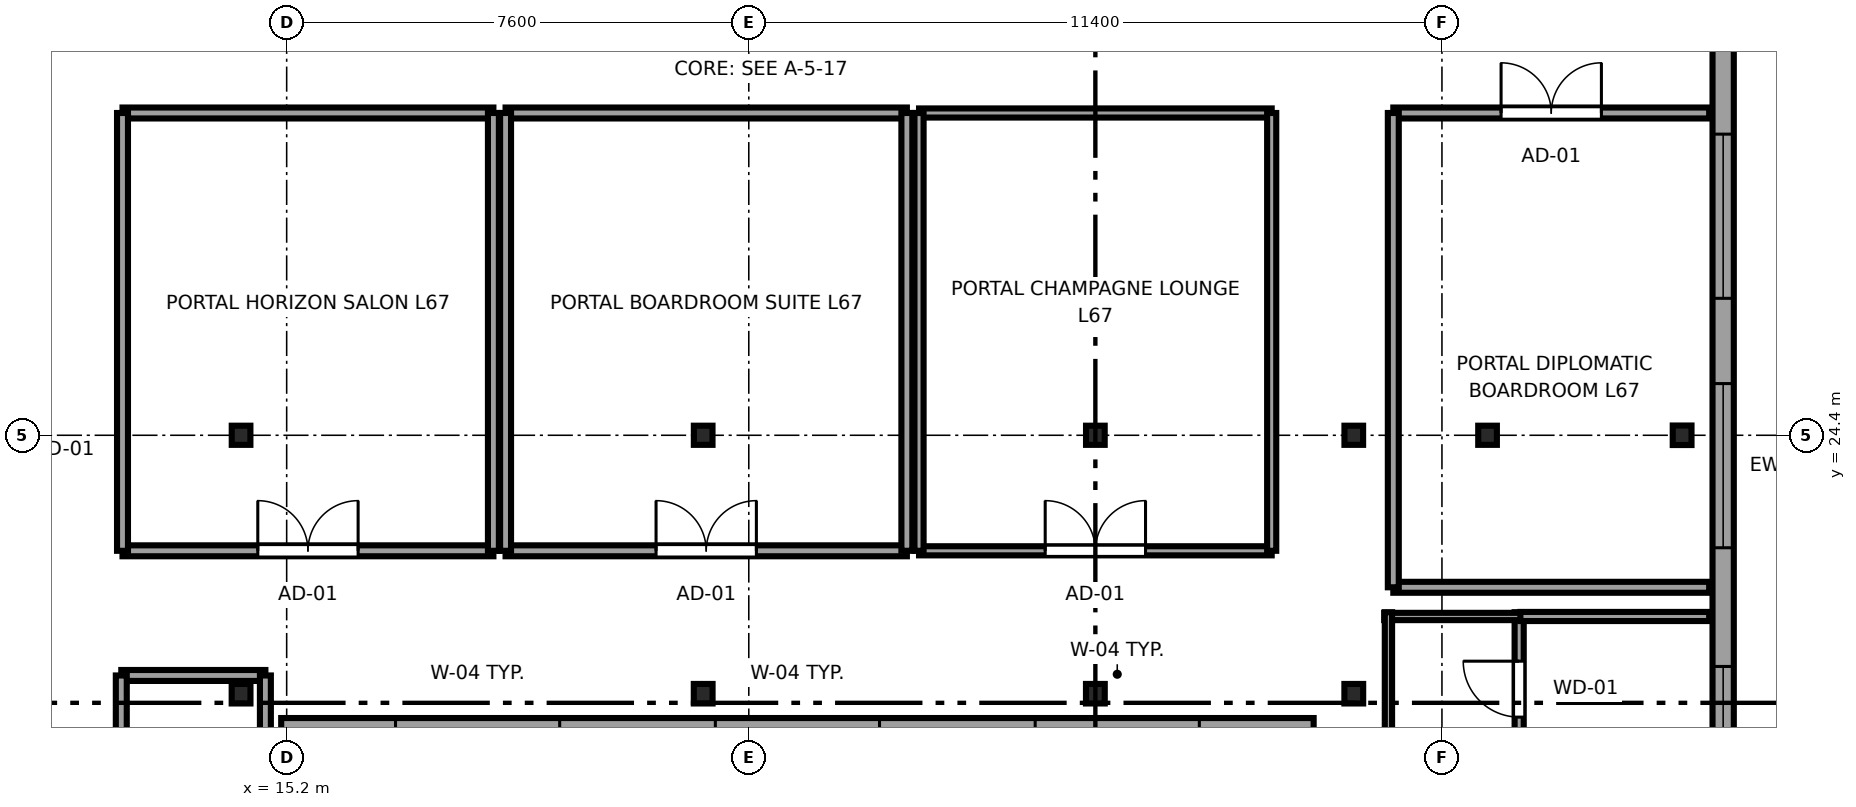
"""IFC4 building model, lengths in metres.
Left out: names, types, materials, properties, quantities, classifications, styles, units other than length and angle.
Written with IfcOpenShell. Run it as: python <this file> out.ifc"""

import sys

from ifc_helpers import new_model, si_unit, direction, frame, frame_2d, origin, origin_2d, place, context, subcontext, project, spatial, rectangle, i_section, extrude, source, transform, mapped, element, fill, save


model = new_model("IFC4")
c1 = context("Model", 3, precision=1e-05, world=origin(), true_north=direction((0.0, 1.0)))
c2 = subcontext(c1, "Body", "Model", "MODEL_VIEW")
j1 = project(units=[si_unit("LENGTHUNIT", "METRE"), si_unit("PLANEANGLEUNIT", "RADIAN")], contexts=[c1])
p1 = place(None, origin())
s1 = spatial("IfcSite", under=j1, at=p1, CompositionType="ELEMENT")
p2 = place(p1, origin())
s2 = spatial("IfcBuilding", under=s1, at=p2, CompositionType="ELEMENT")
p3 = place(p2, frame((0.0, 0.0, 252.3)))
s3 = spatial("IfcBuildingStorey", under=s2, at=p3, CompositionType="ELEMENT", Elevation=252.3)
m1 = source(origin(), c2, "Body", "SweptSolid", [
    extrude(i_section(OverallWidth=0.307, OverallDepth=0.315, WebThickness=0.012, FlangeThickness=0.019, FilletRadius=0.017, at=origin_2d()), origin(), (0.0, 0.0, 1.0), 3.55),
])
for number, where, z_axis, x_axis in (
    (1, (14.45, 24.4, 0.0), (0.0, 0.0, 1.0), (1.0, 0.0, 0.0)),
    (2, (22.05, 24.4, 0.0), (0.0, 0.0, 1.0), (1.0, 0.0, 0.0)),
    (3, (28.5, 24.4, 0.0), (0.0, 0.0, 1.0), (1.0, 0.0, 0.0)),
    (4, (32.75, 24.4, 0.0), (0.0, 0.0, 1.0), (1.0, 0.0, 0.0)),
    (5, (34.95, 24.4, 0.0), (0.0, 0.0, 1.0), (1.0, 0.0, 0.0)),
):
    element("IfcColumn", number, at=place(p3, frame(where, z_axis=z_axis, x_axis=x_axis)), inside=s3, PredefinedType="COLUMN", context=c2, shape_type="MappedRepresentation", body=[
        mapped(m1, transform((0.0, 0.0, 0.0), x_axis=(1.0, 0.0, 0.0), y_axis=(0.0, 1.0, 0.0), z_axis=(0.0, 0.0, 1.0), scale=1.0)),
    ])
m2 = source(origin(), c2, "Body", "SweptSolid", [
    extrude(i_section(OverallWidth=0.309, OverallDepth=0.321, WebThickness=0.014, FlangeThickness=0.022, FilletRadius=0.017, at=origin_2d()), origin(), (0.0, 0.0, 1.0), 3.55),
])
for number, where, z_axis, x_axis in (
    (6, (38.15, 24.4, 0.0), (0.0, 0.0, 1.0), (1.0, 0.0, 0.0)),
    (7, (14.45, 20.15, 0.0), (0.0, 0.0, 1.0), (1.0, 0.0, 0.0)),
    (8, (22.05, 20.15, 0.0), (0.0, 0.0, 1.0), (1.0, 0.0, 0.0)),
    (9, (28.5, 20.15, 0.0), (0.0, 0.0, 1.0), (1.0, 0.0, 0.0)),
    (10, (32.75, 20.15, 0.0), (0.0, 0.0, 1.0), (1.0, 0.0, 0.0)),
):
    element("IfcColumn", number, at=place(p3, frame(where, z_axis=z_axis, x_axis=x_axis)), inside=s3, PredefinedType="COLUMN", context=c2, shape_type="MappedRepresentation", body=[
        mapped(m2, transform((0.0, 0.0, 0.0), x_axis=(1.0, 0.0, 0.0), y_axis=(0.0, 1.0, 0.0), z_axis=(0.0, 0.0, 1.0), scale=1.0)),
    ])
p4 = place(p3, frame((15.11, 19.575, 0.0), z_axis=(0.0, 0.0, 1.0), x_axis=(1.0, 0.0, 0.0)))
e11 = element("IfcWall", 11, at=p4, inside=s3, PredefinedType="SOLIDWALL", context=c2, shape_type="SweptSolid", body=[
    extrude(rectangle(XDim=16.98, YDim=0.35, at=frame_2d((8.49, 0.0))), origin(), (0.0, 0.0, 1.0), 3.37),
])
p5 = place(p4, frame((1.88, 0.0, 0.68)))
e12 = element("IfcOpeningElement", 12, at=p5, cuts=e11, PredefinedType="OPENING", context=c2, shape_type="SweptSolid", body=[
    extrude(rectangle(XDim=2.7, YDim=1.95, at=frame_2d((1.35, 0.975))), frame((0.0, 0.185, 0.0), z_axis=(0.0, -1.0, 0.0), x_axis=(1.0, 0.0, 0.0)), (0.0, 0.0, 1.0), 0.37),
])
p6 = place(p4, frame((7.14, 0.0, 0.68)))
e13 = element("IfcOpeningElement", 13, at=p6, cuts=e11, PredefinedType="OPENING", context=c2, shape_type="SweptSolid", body=[
    extrude(rectangle(XDim=2.7, YDim=1.95, at=frame_2d((1.35, 0.975))), frame((0.0, 0.185, 0.0), z_axis=(0.0, -1.0, 0.0), x_axis=(1.0, 0.0, 0.0)), (0.0, 0.0, 1.0), 0.37),
])
p7 = place(p4, frame((12.4, 0.0, 0.68)))
e14 = element("IfcOpeningElement", 14, at=p7, cuts=e11, PredefinedType="OPENING", context=c2, shape_type="SweptSolid", body=[
    extrude(rectangle(XDim=2.7, YDim=1.95, at=frame_2d((1.35, 0.975))), frame((0.0, 0.185, 0.0), z_axis=(0.0, -1.0, 0.0), x_axis=(1.0, 0.0, 0.0)), (0.0, 0.0, 1.0), 0.37),
])
p8 = place(p3, frame((38.825, 7.017, 0.0), z_axis=(0.0, 0.0, 1.0), x_axis=(0.0, 1.0, 0.0)))
e15 = element("IfcWall", 15, at=p8, inside=s3, PredefinedType="SOLIDWALL", context=c2, shape_type="SweptSolid", body=[
    extrude(rectangle(XDim=33.766, YDim=0.35, at=frame_2d((16.883, 0.0))), origin(), (0.0, 0.0, 1.0), 3.37),
])
p9 = place(p8, frame((10.881, 0.0, 0.68)))
e16 = element("IfcOpeningElement", 16, at=p9, cuts=e15, PredefinedType="OPENING", context=c2, shape_type="SweptSolid", body=[
    extrude(rectangle(XDim=2.7, YDim=1.95, at=frame_2d((1.35, 0.975))), frame((0.0, 0.185, 0.0), z_axis=(0.0, -1.0, 0.0), x_axis=(1.0, 0.0, 0.0)), (0.0, 0.0, 1.0), 0.37),
])
p10 = place(p8, frame((15.533, 0.0, 0.68)))
e17 = element("IfcOpeningElement", 17, at=p10, cuts=e15, PredefinedType="OPENING", context=c2, shape_type="SweptSolid", body=[
    extrude(rectangle(XDim=2.7, YDim=1.95, at=frame_2d((1.35, 0.975))), frame((0.0, 0.185, 0.0), z_axis=(0.0, -1.0, 0.0), x_axis=(1.0, 0.0, 0.0)), (0.0, 0.0, 1.0), 0.37),
])
p11 = place(p8, frame((19.635, 0.0, 0.68)))
e18 = element("IfcOpeningElement", 18, at=p11, cuts=e15, PredefinedType="OPENING", context=c2, shape_type="SweptSolid", body=[
    extrude(rectangle(XDim=2.7, YDim=1.95, at=frame_2d((1.35, 0.975))), frame((0.0, 0.185, 0.0), z_axis=(0.0, -1.0, 0.0), x_axis=(1.0, 0.0, 0.0)), (0.0, 0.0, 1.0), 0.37),
])
p12 = place(p8, frame((25.387, 0.0, 0.68)))
e19 = element("IfcOpeningElement", 19, at=p12, cuts=e15, PredefinedType="OPENING", context=c2, shape_type="SweptSolid", body=[
    extrude(rectangle(XDim=2.7, YDim=1.95, at=frame_2d((1.35, 0.975))), frame((0.0, 0.185, 0.0), z_axis=(0.0, -1.0, 0.0), x_axis=(1.0, 0.0, 0.0)), (0.0, 0.0, 1.0), 0.37),
])
p13 = place(p8, frame((29.489, 0.0, 0.68)))
e20 = element("IfcOpeningElement", 20, at=p13, cuts=e15, PredefinedType="OPENING", context=c2, shape_type="SweptSolid", body=[
    extrude(rectangle(XDim=2.7, YDim=1.95, at=frame_2d((1.35, 0.975))), frame((0.0, 0.185, 0.0), z_axis=(0.0, -1.0, 0.0), x_axis=(1.0, 0.0, 0.0)), (0.0, 0.0, 1.0), 0.37),
])
p14 = place(p8, frame((0.686, 0.0, 0.62)))
e21 = element("IfcOpeningElement", 21, at=p14, cuts=e15, PredefinedType="OPENING", context=c2, shape_type="SweptSolid", body=[
    extrude(rectangle(XDim=1.5, YDim=1.55, at=frame_2d((0.75, 0.775))), frame((0.0, 0.185, 0.0), z_axis=(0.0, -1.0, 0.0), x_axis=(1.0, 0.0, 0.0)), (0.0, 0.0, 1.0), 0.37),
])
p15 = place(p8, frame((4.733, 0.0, 0.62)))
e22 = element("IfcOpeningElement", 22, at=p15, cuts=e15, PredefinedType="OPENING", context=c2, shape_type="SweptSolid", body=[
    extrude(rectangle(XDim=1.5, YDim=1.55, at=frame_2d((0.75, 0.775))), frame((0.0, 0.185, 0.0), z_axis=(0.0, -1.0, 0.0), x_axis=(1.0, 0.0, 0.0)), (0.0, 0.0, 1.0), 0.37),
])
p16 = place(p3, frame((35.47, 19.1, 0.0), z_axis=(0.0, 0.0, 1.0), x_axis=(0.0, 1.0, 0.0)))
e23 = element("IfcWall", 23, at=p16, inside=s3, PredefinedType="PARTITIONING", context=c2, shape_type="SweptSolid", body=[
    extrude(rectangle(XDim=2.39, YDim=0.15, at=frame_2d((1.195, 0.0))), origin(), (0.0, 0.0, 1.0), 3.37),
])
p17 = place(p16, frame((0.665, 0.0, 0.0)))
e24 = element("IfcOpeningElement", 24, at=p17, cuts=e23, PredefinedType="OPENING", context=c2, shape_type="SweptSolid", body=[
    extrude(rectangle(XDim=0.92, YDim=2.01, at=frame_2d((0.46, 1.005))), frame((0.0, 0.085, 0.0), z_axis=(0.0, -1.0, 0.0), x_axis=(1.0, 0.0, 0.0)), (0.0, 0.0, 1.0), 0.17),
])
p18 = place(p3, frame((33.25, 21.42, 0.0), z_axis=(0.0, 0.0, 1.0), x_axis=(1.0, 0.0, 0.0)))
e25 = element("IfcWall", 25, at=p18, inside=s3, PredefinedType="PLUMBINGWALL", context=c2, shape_type="SweptSolid", body=[
    extrude(rectangle(XDim=2.29, YDim=0.12, at=frame_2d((1.145, 0.0))), origin(), (0.0, 0.0, 1.0), 3.37),
])
p19 = place(p3, frame((33.32, 19.1, 0.0), z_axis=(0.0, 0.0, 1.0), x_axis=(0.0, 1.0, 0.0)))
e26 = element("IfcWall", 26, at=p19, inside=s3, PredefinedType="PLUMBINGWALL", context=c2, shape_type="SweptSolid", body=[
    extrude(rectangle(XDim=2.39, YDim=0.12, at=frame_2d((1.195, 0.0))), origin(), (0.0, 0.0, 1.0), 3.37),
])
p20 = place(p3, frame((35.49, 21.42, 0.0), z_axis=(0.0, 0.0, 1.0), x_axis=(1.0, 0.0, 0.0)))
e27 = element("IfcWall", 27, at=p20, inside=s3, PredefinedType="PARTITIONING", context=c2, shape_type="SweptSolid", body=[
    extrude(rectangle(XDim=3.105, YDim=0.15, at=frame_2d((1.552, 0.0))), origin(), (0.0, 0.0, 1.0), 3.37),
])
p21 = place(p3, frame((12.48, 20.45, 0.0), z_axis=(0.0, 0.0, 1.0), x_axis=(1.0, 0.0, 0.0)))
e28 = element("IfcWall", 28, at=p21, inside=s3, PredefinedType="PARTITIONING", context=c2, shape_type="SweptSolid", body=[
    extrude(rectangle(XDim=2.37, YDim=0.18, at=frame_2d((1.185, 0.0))), origin(), (0.0, 0.0, 1.0), 3.37),
])
p22 = place(p3, frame((12.48, 10.2, 0.0), z_axis=(0.0, 0.0, 1.0), x_axis=(0.0, 1.0, 0.0)))
e29 = element("IfcWall", 29, at=p22, inside=s3, PredefinedType="PARTITIONING", context=c2, shape_type="SweptSolid", body=[
    extrude(rectangle(XDim=10.25, YDim=0.18, at=frame_2d((5.125, 0.0))), origin(), (0.0, 0.0, 1.0), 3.37),
])
p23 = place(p22, frame((4.3, 0.0, 0.0)))
e30 = element("IfcOpeningElement", 30, at=p23, cuts=e29, PredefinedType="OPENING", context=c2, shape_type="SweptSolid", body=[
    extrude(rectangle(XDim=1.65, YDim=2.15, at=frame_2d((0.825, 1.075))), frame((0.0, 0.1, 0.0), z_axis=(0.0, -1.0, 0.0), x_axis=(1.0, 0.0, 0.0)), (0.0, 0.0, 1.0), 0.2),
])
p24 = place(p3, frame((14.85, 10.2, 0.0), z_axis=(0.0, 0.0, 1.0), x_axis=(0.0, 1.0, 0.0)))
e31 = element("IfcWall", 31, at=p24, inside=s3, PredefinedType="PARTITIONING", context=c2, shape_type="SweptSolid", body=[
    extrude(rectangle(XDim=10.25, YDim=0.18, at=frame_2d((5.125, 0.0))), origin(), (0.0, 0.0, 1.0), 3.37),
])
p25 = place(p3, frame((12.5, 22.5, 0.0), z_axis=(0.0, 0.0, 1.0), x_axis=(1.0, 0.0, 0.0)))
e32 = element("IfcWall", 32, at=p25, inside=s3, PredefinedType="PARTITIONING", context=c2, shape_type="SweptSolid", body=[
    extrude(rectangle(XDim=6.1, YDim=0.18, at=frame_2d((3.05, 0.0))), origin(), (0.0, 0.0, 1.0), 3.37),
])
p26 = place(p25, frame((2.225, 0.0, 0.0)))
e33 = element("IfcOpeningElement", 33, at=p26, cuts=e32, PredefinedType="OPENING", context=c2, shape_type="SweptSolid", body=[
    extrude(rectangle(XDim=1.65, YDim=2.15, at=frame_2d((0.825, 1.075))), frame((0.0, 0.1, 0.0), z_axis=(0.0, -1.0, 0.0), x_axis=(1.0, 0.0, 0.0)), (0.0, 0.0, 1.0), 0.2),
])
p27 = place(p3, frame((12.5, 29.7, 0.0), z_axis=(0.0, 0.0, 1.0), x_axis=(1.0, 0.0, 0.0)))
e34 = element("IfcWall", 34, at=p27, inside=s3, PredefinedType="PARTITIONING", context=c2, shape_type="SweptSolid", body=[
    extrude(rectangle(XDim=6.1, YDim=0.18, at=frame_2d((3.05, 0.0))), origin(), (0.0, 0.0, 1.0), 3.37),
])
for number, where, z_axis, x_axis in (
    (35, (12.5, 22.5, 0.0), (0.0, 0.0, 1.0), (0.0, 1.0, 0.0)),
    (36, (18.6, 22.5, 0.0), (0.0, 0.0, 1.0), (0.0, 1.0, 0.0)),
):
    element("IfcWall", number, at=place(p3, frame(where, z_axis=z_axis, x_axis=x_axis)), inside=s3, PredefinedType="PARTITIONING", context=c2, shape_type="SweptSolid", body=[
        extrude(rectangle(XDim=7.2, YDim=0.18, at=frame_2d((3.6, 0.0))), origin(), (0.0, 0.0, 1.0), 3.37),
    ])
p28 = place(p3, frame((18.8, 22.5, 0.0), z_axis=(0.0, 0.0, 1.0), x_axis=(1.0, 0.0, 0.0)))
e37 = element("IfcWall", 37, at=p28, inside=s3, PredefinedType="PARTITIONING", context=c2, shape_type="SweptSolid", body=[
    extrude(rectangle(XDim=6.6, YDim=0.18, at=frame_2d((3.3, 0.0))), origin(), (0.0, 0.0, 1.0), 3.37),
])
p29 = place(p28, frame((2.475, 0.0, 0.0)))
e38 = element("IfcOpeningElement", 38, at=p29, cuts=e37, PredefinedType="OPENING", context=c2, shape_type="SweptSolid", body=[
    extrude(rectangle(XDim=1.65, YDim=2.15, at=frame_2d((0.825, 1.075))), frame((0.0, 0.1, 0.0), z_axis=(0.0, -1.0, 0.0), x_axis=(1.0, 0.0, 0.0)), (0.0, 0.0, 1.0), 0.2),
])
p30 = place(p3, frame((18.8, 29.7, 0.0), z_axis=(0.0, 0.0, 1.0), x_axis=(1.0, 0.0, 0.0)))
e39 = element("IfcWall", 39, at=p30, inside=s3, PredefinedType="PARTITIONING", context=c2, shape_type="SweptSolid", body=[
    extrude(rectangle(XDim=6.6, YDim=0.18, at=frame_2d((3.3, 0.0))), origin(), (0.0, 0.0, 1.0), 3.37),
])
for number, where, z_axis, x_axis in (
    (40, (18.8, 22.5, 0.0), (0.0, 0.0, 1.0), (0.0, 1.0, 0.0)),
    (41, (25.4, 22.5, 0.0), (0.0, 0.0, 1.0), (0.0, 1.0, 0.0)),
):
    element("IfcWall", number, at=place(p3, frame(where, z_axis=z_axis, x_axis=x_axis)), inside=s3, PredefinedType="PARTITIONING", context=c2, shape_type="SweptSolid", body=[
        extrude(rectangle(XDim=7.2, YDim=0.18, at=frame_2d((3.6, 0.0))), origin(), (0.0, 0.0, 1.0), 3.37),
    ])
p31 = place(p3, frame((25.6, 22.5, 0.0), z_axis=(0.0, 0.0, 1.0), x_axis=(1.0, 0.0, 0.0)))
e42 = element("IfcWall", 42, at=p31, inside=s3, PredefinedType="PARTITIONING", context=c2, shape_type="SweptSolid", body=[
    extrude(rectangle(XDim=5.8, YDim=0.15, at=frame_2d((2.9, 0.0))), origin(), (0.0, 0.0, 1.0), 3.37),
])
p32 = place(p31, frame((2.075, 0.0, 0.0)))
e43 = element("IfcOpeningElement", 43, at=p32, cuts=e42, PredefinedType="OPENING", context=c2, shape_type="SweptSolid", body=[
    extrude(rectangle(XDim=1.65, YDim=2.15, at=frame_2d((0.825, 1.075))), frame((0.0, 0.085, 0.0), z_axis=(0.0, -1.0, 0.0), x_axis=(1.0, 0.0, 0.0)), (0.0, 0.0, 1.0), 0.17),
])
p33 = place(p3, frame((25.6, 29.7, 0.0), z_axis=(0.0, 0.0, 1.0), x_axis=(1.0, 0.0, 0.0)))
e44 = element("IfcWall", 44, at=p33, inside=s3, PredefinedType="PARTITIONING", context=c2, shape_type="SweptSolid", body=[
    extrude(rectangle(XDim=5.8, YDim=0.15, at=frame_2d((2.9, 0.0))), origin(), (0.0, 0.0, 1.0), 3.37),
])
for number, where, z_axis, x_axis in (
    (45, (25.6, 22.5, 0.0), (0.0, 0.0, 1.0), (0.0, 1.0, 0.0)),
    (46, (31.4, 22.5, 0.0), (0.0, 0.0, 1.0), (0.0, 1.0, 0.0)),
):
    element("IfcWall", number, at=place(p3, frame(where, z_axis=z_axis, x_axis=x_axis)), inside=s3, PredefinedType="PARTITIONING", context=c2, shape_type="SweptSolid", body=[
        extrude(rectangle(XDim=7.2, YDim=0.15, at=frame_2d((3.6, 0.0))), origin(), (0.0, 0.0, 1.0), 3.37),
    ])
p34 = place(p3, frame((33.4, 21.9, 0.0), z_axis=(0.0, 0.0, 1.0), x_axis=(1.0, 0.0, 0.0)))
e47 = element("IfcWall", 47, at=p34, inside=s3, PredefinedType="PARTITIONING", context=c2, shape_type="SweptSolid", body=[
    extrude(rectangle(XDim=5.195, YDim=0.18, at=frame_2d((2.598, 0.0))), origin(), (0.0, 0.0, 1.0), 3.37),
])
p35 = place(p3, frame((33.4, 29.7, 0.0), z_axis=(0.0, 0.0, 1.0), x_axis=(1.0, 0.0, 0.0)))
e48 = element("IfcWall", 48, at=p35, inside=s3, PredefinedType="PARTITIONING", context=c2, shape_type="SweptSolid", body=[
    extrude(rectangle(XDim=5.195, YDim=0.18, at=frame_2d((2.598, 0.0))), origin(), (0.0, 0.0, 1.0), 3.37),
])
p36 = place(p35, frame((1.772, 0.0, 0.0)))
e49 = element("IfcOpeningElement", 49, at=p36, cuts=e48, PredefinedType="OPENING", context=c2, shape_type="SweptSolid", body=[
    extrude(rectangle(XDim=1.65, YDim=2.15, at=frame_2d((0.825, 1.075))), frame((0.0, 0.1, 0.0), z_axis=(0.0, -1.0, 0.0), x_axis=(1.0, 0.0, 0.0)), (0.0, 0.0, 1.0), 0.2),
])
p37 = place(p3, frame((33.4, 21.9, 0.0), z_axis=(0.0, 0.0, 1.0), x_axis=(0.0, 1.0, 0.0)))
e50 = element("IfcWall", 50, at=p37, inside=s3, PredefinedType="PARTITIONING", context=c2, shape_type="SweptSolid", body=[
    extrude(rectangle(XDim=7.8, YDim=0.18, at=frame_2d((3.9, 0.0))), origin(), (0.0, 0.0, 1.0), 3.37),
])
m3 = source(origin(), c2, "Body", "SweptSolid", [
    extrude(rectangle(XDim=2.7, YDim=1.95, at=frame_2d((1.35, 0.975))), frame((0.0, 0.09, 0.0), z_axis=(0.0, -1.0, 0.0), x_axis=(1.0, 0.0, 0.0)), (0.0, 0.0, 1.0), 0.06),
])
p38 = place(p5, origin())
e51 = element("IfcWindow", 51, at=p38, inside=s3, PartitioningType="TRIPLE_PANEL_HORIZONTAL", PredefinedType="WINDOW", context=c2, shape_type="MappedRepresentation", body=[
    mapped(m3, transform((0.0, 0.0, 0.0), x_axis=(1.0, 0.0, 0.0), y_axis=(0.0, 1.0, 0.0), z_axis=(0.0, 0.0, 1.0), scale=1.0)),
])
fill(e12, e51)
p39 = place(p6, origin())
e52 = element("IfcWindow", 52, at=p39, inside=s3, PartitioningType="TRIPLE_PANEL_HORIZONTAL", PredefinedType="WINDOW", context=c2, shape_type="MappedRepresentation", body=[
    mapped(m3, transform((0.0, 0.0, 0.0), x_axis=(1.0, 0.0, 0.0), y_axis=(0.0, 1.0, 0.0), z_axis=(0.0, 0.0, 1.0), scale=1.0)),
])
fill(e13, e52)
p40 = place(p7, origin())
e53 = element("IfcWindow", 53, at=p40, inside=s3, PartitioningType="TRIPLE_PANEL_HORIZONTAL", PredefinedType="WINDOW", context=c2, shape_type="MappedRepresentation", body=[
    mapped(m3, transform((0.0, 0.0, 0.0), x_axis=(1.0, 0.0, 0.0), y_axis=(0.0, 1.0, 0.0), z_axis=(0.0, 0.0, 1.0), scale=1.0)),
])
fill(e14, e53)
p41 = place(p9, origin())
e54 = element("IfcWindow", 54, at=p41, inside=s3, PartitioningType="TRIPLE_PANEL_HORIZONTAL", PredefinedType="WINDOW", context=c2, shape_type="MappedRepresentation", body=[
    mapped(m3, transform((0.0, 0.0, 0.0), x_axis=(1.0, 0.0, 0.0), y_axis=(0.0, 1.0, 0.0), z_axis=(0.0, 0.0, 1.0), scale=1.0)),
])
fill(e16, e54)
p42 = place(p10, origin())
e55 = element("IfcWindow", 55, at=p42, inside=s3, PartitioningType="TRIPLE_PANEL_HORIZONTAL", PredefinedType="WINDOW", context=c2, shape_type="MappedRepresentation", body=[
    mapped(m3, transform((0.0, 0.0, 0.0), x_axis=(1.0, 0.0, 0.0), y_axis=(0.0, 1.0, 0.0), z_axis=(0.0, 0.0, 1.0), scale=1.0)),
])
fill(e17, e55)
p43 = place(p11, origin())
e56 = element("IfcWindow", 56, at=p43, inside=s3, PartitioningType="TRIPLE_PANEL_HORIZONTAL", PredefinedType="WINDOW", context=c2, shape_type="MappedRepresentation", body=[
    mapped(m3, transform((0.0, 0.0, 0.0), x_axis=(1.0, 0.0, 0.0), y_axis=(0.0, 1.0, 0.0), z_axis=(0.0, 0.0, 1.0), scale=1.0)),
])
fill(e18, e56)
m4 = source(origin(), c2, "Body", "SweptSolid", [
    extrude(rectangle(XDim=0.92, YDim=2.01, at=frame_2d((0.46, 1.005))), frame((0.0, 0.025, 0.0), z_axis=(0.0, -1.0, 0.0), x_axis=(1.0, 0.0, 0.0)), (0.0, 0.0, 1.0), 0.05),
])
p44 = place(p17, origin())
e57 = element("IfcDoor", 57, at=p44, inside=s3, OperationType="SINGLE_SWING_RIGHT", PredefinedType="DOOR", context=c2, shape_type="MappedRepresentation", body=[
    mapped(m4, transform((0.0, 0.0, 0.0), x_axis=(1.0, 0.0, 0.0), y_axis=(0.0, 1.0, 0.0), z_axis=(0.0, 0.0, 1.0), scale=1.0)),
])
fill(e24, e57)
m5 = source(origin(), c2, "Body", "SweptSolid", [
    extrude(rectangle(XDim=1.65, YDim=2.15, at=frame_2d((0.825, 1.075))), frame((0.0, 0.025, 0.0), z_axis=(0.0, -1.0, 0.0), x_axis=(1.0, 0.0, 0.0)), (0.0, 0.0, 1.0), 0.05),
])
p45 = place(p26, origin())
e58 = element("IfcDoor", 58, at=p45, inside=s3, OperationType="DOUBLE_DOOR_SINGLE_SWING", PredefinedType="DOOR", context=c2, shape_type="MappedRepresentation", body=[
    mapped(m5, transform((0.0, 0.0, 0.0), x_axis=(1.0, 0.0, 0.0), y_axis=(0.0, 1.0, 0.0), z_axis=(0.0, 0.0, 1.0), scale=1.0)),
])
fill(e33, e58)
p46 = place(p29, origin())
e59 = element("IfcDoor", 59, at=p46, inside=s3, OperationType="DOUBLE_DOOR_SINGLE_SWING", PredefinedType="DOOR", context=c2, shape_type="MappedRepresentation", body=[
    mapped(m5, transform((0.0, 0.0, 0.0), x_axis=(1.0, 0.0, 0.0), y_axis=(0.0, 1.0, 0.0), z_axis=(0.0, 0.0, 1.0), scale=1.0)),
])
fill(e38, e59)
p47 = place(p32, origin())
e60 = element("IfcDoor", 60, at=p47, inside=s3, OperationType="DOUBLE_DOOR_SINGLE_SWING", PredefinedType="DOOR", context=c2, shape_type="MappedRepresentation", body=[
    mapped(m5, transform((0.0, 0.0, 0.0), x_axis=(1.0, 0.0, 0.0), y_axis=(0.0, 1.0, 0.0), z_axis=(0.0, 0.0, 1.0), scale=1.0)),
])
fill(e43, e60)
p48 = place(p36, origin())
e61 = element("IfcDoor", 61, at=p48, inside=s3, OperationType="DOUBLE_DOOR_SINGLE_SWING", PredefinedType="DOOR", context=c2, shape_type="MappedRepresentation", body=[
    mapped(m5, transform((0.0, 0.0, 0.0), x_axis=(1.0, 0.0, 0.0), y_axis=(0.0, 1.0, 0.0), z_axis=(0.0, 0.0, 1.0), scale=1.0)),
])
fill(e49, e61)
save(model, sys.argv[1])
